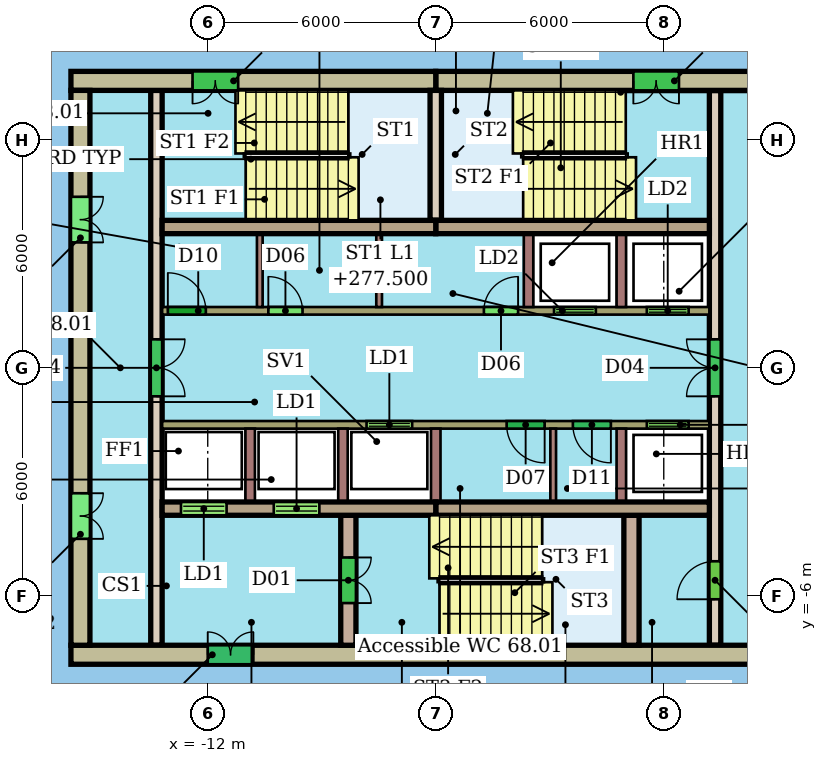
"""IFC4 building model, lengths in metres.
Left out: names, types, materials, properties, quantities, classifications, styles, units other than length and angle.
Written with IfcOpenShell. Run it as: python <this file> out.ifc"""

import sys

from ifc_helpers import new_model, si_unit, direction, frame, frame_2d, origin, place, context, subcontext, project, spatial, rectangle, extrude, element, fill, save


model = new_model("IFC4")
c1 = context("Model", 3, precision=1e-05, world=origin(), true_north=direction((0.0, 1.0)))
c2 = subcontext(c1, "Body", "Model", "MODEL_VIEW")
j1 = project(units=[si_unit("LENGTHUNIT", "METRE"), si_unit("PLANEANGLEUNIT", "RADIAN")], contexts=[c1])
p1 = place(None, origin())
s1 = spatial("IfcSite", under=j1, at=p1, CompositionType="ELEMENT")
p2 = place(p1, origin())
s2 = spatial("IfcBuilding", under=s1, at=p2, CompositionType="ELEMENT")
p3 = place(p2, frame((0.0, 0.0, 275.7)))
s3 = spatial("IfcBuildingStorey", under=s2, at=p3, CompositionType="ELEMENT", Elevation=275.7)
p4 = place(p3, frame((3.6, 7.55, 0.0), z_axis=(0.0, 0.0, 1.0), x_axis=(-1.0, 0.0, 0.0)))
e1 = element("IfcWall", 1, at=p4, inside=s3, PredefinedType="SHEAR", context=c2, shape_type="SweptSolid", body=[
    extrude(rectangle(XDim=9.6, YDim=0.5, at=frame_2d((4.8, 0.0))), origin(), (0.0, 0.0, 1.0), 3.3),
])
p5 = place(p4, frame((3.2, 0.0, 0.0)))
e2 = element("IfcOpeningElement", 2, at=p5, cuts=e1, PredefinedType="OPENING", context=c2, shape_type="SweptSolid", body=[
    extrude(rectangle(XDim=1.2, YDim=2.1, at=frame_2d((0.6, 1.05))), frame((0.0, 0.26, 0.0), z_axis=(0.0, -1.0, 0.0), x_axis=(1.0, 0.0, 0.0)), (0.0, 0.0, 1.0), 0.52),
])
p6 = place(p3, frame((-6.0, 7.55, 0.0), z_axis=(0.0, 0.0, 1.0), x_axis=(-1.0, 0.0, 0.0)))
e3 = element("IfcWall", 3, at=p6, inside=s3, PredefinedType="SHEAR", context=c2, shape_type="SweptSolid", body=[
    extrude(rectangle(XDim=9.6, YDim=0.5, at=frame_2d((4.8, 0.0))), origin(), (0.0, 0.0, 1.0), 3.3),
])
p7 = place(p6, frame((5.2, 0.0, 0.0)))
e4 = element("IfcOpeningElement", 4, at=p7, cuts=e3, PredefinedType="OPENING", context=c2, shape_type="SweptSolid", body=[
    extrude(rectangle(XDim=1.2, YDim=2.1, at=frame_2d((0.6, 1.05))), frame((0.0, 0.26, 0.0), z_axis=(0.0, -1.0, 0.0), x_axis=(1.0, 0.0, 0.0)), (0.0, 0.0, 1.0), 0.52),
])
p8 = place(p3, frame((-15.6, -7.55, 0.0), z_axis=(0.0, 0.0, 1.0), x_axis=(1.0, 0.0, 0.0)))
e5 = element("IfcWall", 5, at=p8, inside=s3, PredefinedType="SHEAR", context=c2, shape_type="SweptSolid", body=[
    extrude(rectangle(XDim=19.2, YDim=0.5, at=frame_2d((9.6, 0.0))), origin(), (0.0, 0.0, 1.0), 3.3),
])
p9 = place(p8, frame((3.6, 0.0, 0.0)))
e6 = element("IfcOpeningElement", 6, at=p9, cuts=e5, PredefinedType="OPENING", context=c2, shape_type="SweptSolid", body=[
    extrude(rectangle(XDim=1.2, YDim=2.1, at=frame_2d((0.6, 1.05))), frame((0.0, 0.26, 0.0), z_axis=(0.0, -1.0, 0.0), x_axis=(1.0, 0.0, 0.0)), (0.0, 0.0, 1.0), 0.52),
])
p10 = place(p3, frame((-15.35, 7.3, 0.0), z_axis=(0.0, 0.0, 1.0), x_axis=(0.0, -1.0, 0.0)))
e7 = element("IfcWall", 7, at=p10, inside=s3, PredefinedType="SHEAR", context=c2, shape_type="SweptSolid", body=[
    extrude(rectangle(XDim=14.6, YDim=0.5, at=frame_2d((7.3, 0.0))), origin(), (0.0, 0.0, 1.0), 3.3),
])
p11 = place(p10, frame((10.6, 0.0, 0.0)))
e8 = element("IfcOpeningElement", 8, at=p11, cuts=e7, PredefinedType="OPENING", context=c2, shape_type="SweptSolid", body=[
    extrude(rectangle(XDim=1.2, YDim=2.1, at=frame_2d((0.6, 1.05))), frame((0.0, 0.26, 0.0), z_axis=(0.0, -1.0, 0.0), x_axis=(1.0, 0.0, 0.0)), (0.0, 0.0, 1.0), 0.52),
])
p12 = place(p10, frame((2.8, 0.0, 0.0)))
e9 = element("IfcOpeningElement", 9, at=p12, cuts=e7, PredefinedType="OPENING", context=c2, shape_type="SweptSolid", body=[
    extrude(rectangle(XDim=1.2, YDim=2.1, at=frame_2d((0.6, 1.05))), frame((0.0, 0.26, 0.0), z_axis=(0.0, -1.0, 0.0), x_axis=(1.0, 0.0, 0.0)), (0.0, 0.0, 1.0), 0.52),
])
for number, where, z_axis, x_axis in (
    (10, (-13.2, 3.705, 0.0), (0.0, 0.0, 1.0), (1.0, 0.0, 0.0)),
    (11, (-6.0, 3.705, 0.0), (0.0, 0.0, 1.0), (1.0, 0.0, 0.0)),
):
    element("IfcWall", number, at=place(p3, frame(where, z_axis=z_axis, x_axis=x_axis)), inside=s3, PredefinedType="SHEAR", context=c2, shape_type="SweptSolid", body=[
        extrude(rectangle(XDim=7.2, YDim=0.35, at=frame_2d((3.6, 0.0))), origin(), (0.0, 0.0, 1.0), 3.3),
    ])
p13 = place(p3, frame((-13.2, -3.705, 0.0), z_axis=(0.0, 0.0, 1.0), x_axis=(1.0, 0.0, 0.0)))
e12 = element("IfcWall", 12, at=p13, inside=s3, PredefinedType="SHEAR", context=c2, shape_type="SweptSolid", body=[
    extrude(rectangle(XDim=7.2, YDim=0.35, at=frame_2d((3.6, 0.0))), origin(), (0.0, 0.0, 1.0), 3.3),
])
p14 = place(p13, frame((0.496, 0.0, 0.0)))
e13 = element("IfcOpeningElement", 13, at=p14, cuts=e12, PredefinedType="OPENING", context=c2, shape_type="SweptSolid", body=[
    extrude(rectangle(XDim=1.2, YDim=2.1, at=frame_2d((0.6, 1.05))), frame((0.0, 0.185, 0.0), z_axis=(0.0, -1.0, 0.0), x_axis=(1.0, 0.0, 0.0)), (0.0, 0.0, 1.0), 0.37),
])
p15 = place(p13, frame((2.938, 0.0, 0.0)))
e14 = element("IfcOpeningElement", 14, at=p15, cuts=e12, PredefinedType="OPENING", context=c2, shape_type="SweptSolid", body=[
    extrude(rectangle(XDim=1.2, YDim=2.1, at=frame_2d((0.6, 1.05))), frame((0.0, 0.185, 0.0), z_axis=(0.0, -1.0, 0.0), x_axis=(1.0, 0.0, 0.0)), (0.0, 0.0, 1.0), 0.37),
])
p16 = place(p3, frame((-6.0, -3.705, 0.0), z_axis=(0.0, 0.0, 1.0), x_axis=(1.0, 0.0, 0.0)))
e15 = element("IfcWall", 15, at=p16, inside=s3, PredefinedType="SHEAR", context=c2, shape_type="SweptSolid", body=[
    extrude(rectangle(XDim=7.2, YDim=0.35, at=frame_2d((3.6, 0.0))), origin(), (0.0, 0.0, 1.0), 3.3),
])
p17 = place(p3, frame((-13.35, 7.3, 0.0), z_axis=(0.0, 0.0, 1.0), x_axis=(0.0, -1.0, 0.0)))
e16 = element("IfcWall", 16, at=p17, inside=s3, PredefinedType="SHEAR", context=c2, shape_type="SweptSolid", body=[
    extrude(rectangle(XDim=14.6, YDim=0.3, at=frame_2d((7.3, 0.0))), origin(), (0.0, 0.0, 1.0), 3.3),
])
p18 = place(p17, frame((6.55, 0.0, 0.0)))
e17 = element("IfcOpeningElement", 17, at=p18, cuts=e16, PredefinedType="OPENING", context=c2, shape_type="SweptSolid", body=[
    extrude(rectangle(XDim=1.5, YDim=2.1, at=frame_2d((0.75, 1.05))), frame((0.0, 0.16, 0.0), z_axis=(0.0, -1.0, 0.0), x_axis=(1.0, 0.0, 0.0)), (0.0, 0.0, 1.0), 0.32),
])
p19 = place(p3, frame((1.35, -7.3, 0.0), z_axis=(0.0, 0.0, 1.0), x_axis=(0.0, 1.0, 0.0)))
e18 = element("IfcWall", 18, at=p19, inside=s3, PredefinedType="SHEAR", context=c2, shape_type="SweptSolid", body=[
    extrude(rectangle(XDim=14.6, YDim=0.3, at=frame_2d((7.3, 0.0))), origin(), (0.0, 0.0, 1.0), 3.3),
])
p20 = place(p19, frame((1.21, 0.0, 0.0)))
e19 = element("IfcOpeningElement", 19, at=p20, cuts=e18, PredefinedType="OPENING", context=c2, shape_type="SweptSolid", body=[
    extrude(rectangle(XDim=1.0, YDim=2.1, at=frame_2d((0.5, 1.05))), frame((0.0, 0.16, 0.0), z_axis=(0.0, -1.0, 0.0), x_axis=(1.0, 0.0, 0.0)), (0.0, 0.0, 1.0), 0.32),
])
p21 = place(p19, frame((6.55, 0.0, 0.0)))
e20 = element("IfcOpeningElement", 20, at=p21, cuts=e18, PredefinedType="OPENING", context=c2, shape_type="SweptSolid", body=[
    extrude(rectangle(XDim=1.5, YDim=2.1, at=frame_2d((0.75, 1.05))), frame((0.0, 0.16, 0.0), z_axis=(0.0, -1.0, 0.0), x_axis=(1.0, 0.0, 0.0)), (0.0, 0.0, 1.0), 0.32),
])
p22 = place(p3, frame((-13.2, 1.5, 0.0), z_axis=(0.0, 0.0, 1.0), x_axis=(1.0, 0.0, 0.0)))
e21 = element("IfcWall", 21, at=p22, inside=s3, PredefinedType="SHEAR", context=c2, shape_type="SweptSolid", body=[
    extrude(rectangle(XDim=14.4, YDim=0.2, at=frame_2d((7.2, 0.0))), origin(), (0.0, 0.0, 1.0), 3.3),
])
p23 = place(p22, frame((10.312, 0.0, 0.0)))
e22 = element("IfcOpeningElement", 22, at=p23, cuts=e21, PredefinedType="OPENING", context=c2, shape_type="SweptSolid", body=[
    extrude(rectangle(XDim=1.1, YDim=2.1, at=frame_2d((0.55, 1.05))), frame((0.0, 0.11, 0.0), z_axis=(0.0, -1.0, 0.0), x_axis=(1.0, 0.0, 0.0)), (0.0, 0.0, 1.0), 0.22),
])
p24 = place(p22, frame((12.754, 0.0, 0.0)))
e23 = element("IfcOpeningElement", 23, at=p24, cuts=e21, PredefinedType="OPENING", context=c2, shape_type="SweptSolid", body=[
    extrude(rectangle(XDim=1.1, YDim=2.1, at=frame_2d((0.55, 1.05))), frame((0.0, 0.11, 0.0), z_axis=(0.0, -1.0, 0.0), x_axis=(1.0, 0.0, 0.0)), (0.0, 0.0, 1.0), 0.22),
])
p25 = place(p22, frame((0.15, 0.0, 0.0)))
e24 = element("IfcOpeningElement", 24, at=p25, cuts=e21, PredefinedType="OPENING", context=c2, shape_type="SweptSolid", body=[
    extrude(rectangle(XDim=1.0, YDim=2.1, at=frame_2d((0.5, 1.05))), frame((0.0, 0.11, 0.0), z_axis=(0.0, -1.0, 0.0), x_axis=(1.0, 0.0, 0.0)), (0.0, 0.0, 1.0), 0.22),
])
p26 = place(p22, frame((2.794, 0.0, 0.0)))
e25 = element("IfcOpeningElement", 25, at=p26, cuts=e21, PredefinedType="OPENING", context=c2, shape_type="SweptSolid", body=[
    extrude(rectangle(XDim=0.9, YDim=2.1, at=frame_2d((0.45, 1.05))), frame((0.0, 0.11, 0.0), z_axis=(0.0, -1.0, 0.0), x_axis=(1.0, 0.0, 0.0)), (0.0, 0.0, 1.0), 0.22),
])
p27 = place(p22, frame((8.467, 0.0, 0.0)))
e26 = element("IfcOpeningElement", 26, at=p27, cuts=e21, PredefinedType="OPENING", context=c2, shape_type="SweptSolid", body=[
    extrude(rectangle(XDim=0.9, YDim=2.1, at=frame_2d((0.45, 1.05))), frame((0.0, 0.11, 0.0), z_axis=(0.0, -1.0, 0.0), x_axis=(1.0, 0.0, 0.0)), (0.0, 0.0, 1.0), 0.22),
])
p28 = place(p3, frame((1.2, -1.5, 0.0), z_axis=(0.0, 0.0, 1.0), x_axis=(-1.0, 0.0, 0.0)))
e27 = element("IfcWall", 27, at=p28, inside=s3, PredefinedType="SHEAR", context=c2, shape_type="SweptSolid", body=[
    extrude(rectangle(XDim=14.4, YDim=0.2, at=frame_2d((7.2, 0.0))), origin(), (0.0, 0.0, 1.0), 3.3),
])
p29 = place(p28, frame((7.821, 0.0, 0.0)))
e28 = element("IfcOpeningElement", 28, at=p29, cuts=e27, PredefinedType="OPENING", context=c2, shape_type="SweptSolid", body=[
    extrude(rectangle(XDim=1.2, YDim=2.1, at=frame_2d((0.6, 1.05))), frame((0.0, 0.11, 0.0), z_axis=(0.0, -1.0, 0.0), x_axis=(1.0, 0.0, 0.0)), (0.0, 0.0, 1.0), 0.22),
])
p30 = place(p28, frame((0.546, 0.0, 0.0)))
e29 = element("IfcOpeningElement", 29, at=p30, cuts=e27, PredefinedType="OPENING", context=c2, shape_type="SweptSolid", body=[
    extrude(rectangle(XDim=1.1, YDim=2.1, at=frame_2d((0.55, 1.05))), frame((0.0, 0.11, 0.0), z_axis=(0.0, -1.0, 0.0), x_axis=(1.0, 0.0, 0.0)), (0.0, 0.0, 1.0), 0.22),
])
p31 = place(p28, frame((4.335, 0.0, 0.0)))
e30 = element("IfcOpeningElement", 30, at=p31, cuts=e27, PredefinedType="OPENING", context=c2, shape_type="SweptSolid", body=[
    extrude(rectangle(XDim=1.0, YDim=2.1, at=frame_2d((0.5, 1.05))), frame((0.0, 0.11, 0.0), z_axis=(0.0, -1.0, 0.0), x_axis=(1.0, 0.0, 0.0)), (0.0, 0.0, 1.0), 0.22),
])
p32 = place(p28, frame((2.592, 0.0, 0.0)))
e31 = element("IfcOpeningElement", 31, at=p32, cuts=e27, PredefinedType="OPENING", context=c2, shape_type="SweptSolid", body=[
    extrude(rectangle(XDim=1.0, YDim=2.1, at=frame_2d((0.5, 1.05))), frame((0.0, 0.11, 0.0), z_axis=(0.0, -1.0, 0.0), x_axis=(1.0, 0.0, 0.0)), (0.0, 0.0, 1.0), 0.22),
])
p33 = place(p3, frame((-8.3, -3.88, 0.0), z_axis=(0.0, 0.0, 1.0), x_axis=(0.0, -1.0, 0.0)))
e32 = element("IfcWall", 32, at=p33, inside=s3, PredefinedType="SHEAR", context=c2, shape_type="SweptSolid", body=[
    extrude(rectangle(XDim=3.42, YDim=0.4, at=frame_2d((1.71, 0.0))), origin(), (0.0, 0.0, 1.0), 3.3),
])
p34 = place(p33, frame((1.11, 0.0, 0.0)))
e33 = element("IfcOpeningElement", 33, at=p34, cuts=e32, PredefinedType="OPENING", context=c2, shape_type="SweptSolid", body=[
    extrude(rectangle(XDim=1.2, YDim=2.1, at=frame_2d((0.6, 1.05))), frame((0.0, 0.21, 0.0), z_axis=(0.0, -1.0, 0.0), x_axis=(1.0, 0.0, 0.0)), (0.0, 0.0, 1.0), 0.42),
])
p35 = place(p3, frame((-0.85, -3.88, 0.0), z_axis=(0.0, 0.0, 1.0), x_axis=(0.0, -1.0, 0.0)))
e34 = element("IfcWall", 34, at=p35, inside=s3, PredefinedType="SHEAR", context=c2, shape_type="SweptSolid", body=[
    extrude(rectangle(XDim=3.42, YDim=0.4, at=frame_2d((1.71, 0.0))), origin(), (0.0, 0.0, 1.0), 3.3),
])
p36 = place(p3, frame((-6.0, 3.88, 0.0), z_axis=(0.0, 0.0, 1.0), x_axis=(0.0, 1.0, 0.0)))
e35 = element("IfcWall", 35, at=p36, inside=s3, PredefinedType="SHEAR", context=c2, shape_type="SweptSolid", body=[
    extrude(rectangle(XDim=3.42, YDim=0.3, at=frame_2d((1.71, 0.0))), origin(), (0.0, 0.0, 1.0), 3.3),
])
for number, where, z_axis, x_axis in (
    (36, (-3.558, 1.6, 0.0), (0.0, 0.0, 1.0), (0.0, 1.0, 0.0)),
    (37, (-1.117, 1.6, 0.0), (0.0, 0.0, 1.0), (0.0, 1.0, 0.0)),
):
    element("IfcWall", number, at=place(p3, frame(where, z_axis=z_axis, x_axis=x_axis)), inside=s3, PredefinedType="SHEAR", context=c2, shape_type="SweptSolid", body=[
        extrude(rectangle(XDim=1.93, YDim=0.25, at=frame_2d((0.965, 0.0))), origin(), (0.0, 0.0, 1.0), 3.3),
    ])
for number, where, z_axis, x_axis in (
    (38, (-10.631, 1.6, 0.0), (0.0, 0.0, 1.0), (0.0, 1.0, 0.0)),
    (39, (-7.49, 1.6, 0.0), (0.0, 0.0, 1.0), (0.0, 1.0, 0.0)),
):
    element("IfcWall", number, at=place(p3, frame(where, z_axis=z_axis, x_axis=x_axis)), inside=s3, PredefinedType="PARTITIONING", context=c2, shape_type="SweptSolid", body=[
        extrude(rectangle(XDim=1.93, YDim=0.15, at=frame_2d((0.965, 0.0))), origin(), (0.0, 0.0, 1.0), 3.3),
    ])
for number, where, z_axis, x_axis in (
    (40, (-10.883, -1.6, 0.0), (0.0, 0.0, 1.0), (0.0, -1.0, 0.0)),
    (41, (-8.442, -1.6, 0.0), (0.0, 0.0, 1.0), (0.0, -1.0, 0.0)),
    (42, (-6.0, -1.6, 0.0), (0.0, 0.0, 1.0), (0.0, -1.0, 0.0)),
    (43, (-1.117, -1.6, 0.0), (0.0, 0.0, 1.0), (0.0, -1.0, 0.0)),
):
    element("IfcWall", number, at=place(p3, frame(where, z_axis=z_axis, x_axis=x_axis)), inside=s3, PredefinedType="SHEAR", context=c2, shape_type="SweptSolid", body=[
        extrude(rectangle(XDim=1.93, YDim=0.25, at=frame_2d((0.965, 0.0))), origin(), (0.0, 0.0, 1.0), 3.3),
    ])
p37 = place(p3, frame((-2.91, -1.6, 0.0), z_axis=(0.0, 0.0, 1.0), x_axis=(0.0, -1.0, 0.0)))
e44 = element("IfcWall", 44, at=p37, inside=s3, PredefinedType="PARTITIONING", context=c2, shape_type="SweptSolid", body=[
    extrude(rectangle(XDim=1.93, YDim=0.15, at=frame_2d((0.965, 0.0))), origin(), (0.0, 0.0, 1.0), 3.3),
])
p38 = place(p5, origin())
e45 = element("IfcDoor", 45, at=p38, inside=s3, OperationType="DOUBLE_DOOR_SINGLE_SWING", PredefinedType="NOTDEFINED", context=c2, shape_type="SweptSolid", body=[
    extrude(rectangle(XDim=1.2, YDim=2.1, at=frame_2d((0.6, 1.05))), frame((0.0, 0.025, 0.0), z_axis=(0.0, -1.0, 0.0), x_axis=(1.0, 0.0, 0.0)), (0.0, 0.0, 1.0), 0.05),
])
fill(e2, e45)
p39 = place(p7, origin())
e46 = element("IfcDoor", 46, at=p39, inside=s3, OperationType="DOUBLE_DOOR_SINGLE_SWING", PredefinedType="NOTDEFINED", context=c2, shape_type="SweptSolid", body=[
    extrude(rectangle(XDim=1.2, YDim=2.1, at=frame_2d((0.6, 1.05))), frame((0.0, 0.025, 0.0), z_axis=(0.0, -1.0, 0.0), x_axis=(1.0, 0.0, 0.0)), (0.0, 0.0, 1.0), 0.05),
])
fill(e4, e46)
p40 = place(p9, origin())
e47 = element("IfcDoor", 47, at=p40, inside=s3, OperationType="DOUBLE_DOOR_SINGLE_SWING", PredefinedType="NOTDEFINED", context=c2, shape_type="SweptSolid", body=[
    extrude(rectangle(XDim=1.2, YDim=2.1, at=frame_2d((0.6, 1.05))), frame((0.0, 0.025, 0.0), z_axis=(0.0, -1.0, 0.0), x_axis=(1.0, 0.0, 0.0)), (0.0, 0.0, 1.0), 0.05),
])
fill(e6, e47)
p41 = place(p11, origin())
e48 = element("IfcDoor", 48, at=p41, inside=s3, OperationType="DOUBLE_DOOR_SINGLE_SWING", PredefinedType="NOTDEFINED", context=c2, shape_type="SweptSolid", body=[
    extrude(rectangle(XDim=1.2, YDim=2.1, at=frame_2d((0.6, 1.05))), frame((0.0, 0.025, 0.0), z_axis=(0.0, -1.0, 0.0), x_axis=(1.0, 0.0, 0.0)), (0.0, 0.0, 1.0), 0.05),
])
fill(e8, e48)
p42 = place(p12, origin())
e49 = element("IfcDoor", 49, at=p42, inside=s3, OperationType="DOUBLE_DOOR_SINGLE_SWING", PredefinedType="NOTDEFINED", context=c2, shape_type="SweptSolid", body=[
    extrude(rectangle(XDim=1.2, YDim=2.1, at=frame_2d((0.6, 1.05))), frame((0.0, 0.025, 0.0), z_axis=(0.0, -1.0, 0.0), x_axis=(1.0, 0.0, 0.0)), (0.0, 0.0, 1.0), 0.05),
])
fill(e9, e49)
p43 = place(p14, origin())
e50 = element("IfcDoor", 50, at=p43, inside=s3, OperationType="DOUBLE_DOOR_SLIDING", PredefinedType="NOTDEFINED", context=c2, shape_type="SweptSolid", body=[
    extrude(rectangle(XDim=1.2, YDim=2.1, at=frame_2d((0.6, 1.05))), frame((0.0, 0.025, 0.0), z_axis=(0.0, -1.0, 0.0), x_axis=(1.0, 0.0, 0.0)), (0.0, 0.0, 1.0), 0.05),
])
fill(e13, e50)
p44 = place(p15, origin())
e51 = element("IfcDoor", 51, at=p44, inside=s3, OperationType="DOUBLE_DOOR_SLIDING", PredefinedType="NOTDEFINED", context=c2, shape_type="SweptSolid", body=[
    extrude(rectangle(XDim=1.2, YDim=2.1, at=frame_2d((0.6, 1.05))), frame((0.0, 0.025, 0.0), z_axis=(0.0, -1.0, 0.0), x_axis=(1.0, 0.0, 0.0)), (0.0, 0.0, 1.0), 0.05),
])
fill(e14, e51)
p45 = place(p18, origin())
e52 = element("IfcDoor", 52, at=p45, inside=s3, OperationType="DOUBLE_DOOR_SINGLE_SWING", PredefinedType="NOTDEFINED", context=c2, shape_type="SweptSolid", body=[
    extrude(rectangle(XDim=1.5, YDim=2.1, at=frame_2d((0.75, 1.05))), frame((0.0, 0.025, 0.0), z_axis=(0.0, -1.0, 0.0), x_axis=(1.0, 0.0, 0.0)), (0.0, 0.0, 1.0), 0.05),
])
fill(e17, e52)
p46 = place(p20, origin())
e53 = element("IfcDoor", 53, at=p46, inside=s3, OperationType="SINGLE_SWING_LEFT", PredefinedType="NOTDEFINED", context=c2, shape_type="SweptSolid", body=[
    extrude(rectangle(XDim=1.0, YDim=2.1, at=frame_2d((0.5, 1.05))), frame((0.0, 0.025, 0.0), z_axis=(0.0, -1.0, 0.0), x_axis=(1.0, 0.0, 0.0)), (0.0, 0.0, 1.0), 0.05),
])
fill(e19, e53)
p47 = place(p21, origin())
e54 = element("IfcDoor", 54, at=p47, inside=s3, OperationType="DOUBLE_DOOR_SINGLE_SWING", PredefinedType="NOTDEFINED", context=c2, shape_type="SweptSolid", body=[
    extrude(rectangle(XDim=1.5, YDim=2.1, at=frame_2d((0.75, 1.05))), frame((0.0, 0.025, 0.0), z_axis=(0.0, -1.0, 0.0), x_axis=(1.0, 0.0, 0.0)), (0.0, 0.0, 1.0), 0.05),
])
fill(e20, e54)
p48 = place(p23, origin())
e55 = element("IfcDoor", 55, at=p48, inside=s3, OperationType="DOUBLE_DOOR_SLIDING", PredefinedType="NOTDEFINED", context=c2, shape_type="SweptSolid", body=[
    extrude(rectangle(XDim=1.1, YDim=2.1, at=frame_2d((0.55, 1.05))), frame((0.0, 0.025, 0.0), z_axis=(0.0, -1.0, 0.0), x_axis=(1.0, 0.0, 0.0)), (0.0, 0.0, 1.0), 0.05),
])
fill(e22, e55)
p49 = place(p24, origin())
e56 = element("IfcDoor", 56, at=p49, inside=s3, OperationType="DOUBLE_DOOR_SLIDING", PredefinedType="NOTDEFINED", context=c2, shape_type="SweptSolid", body=[
    extrude(rectangle(XDim=1.1, YDim=2.1, at=frame_2d((0.55, 1.05))), frame((0.0, 0.025, 0.0), z_axis=(0.0, -1.0, 0.0), x_axis=(1.0, 0.0, 0.0)), (0.0, 0.0, 1.0), 0.05),
])
fill(e23, e56)
p50 = place(p25, origin())
e57 = element("IfcDoor", 57, at=p50, inside=s3, OperationType="SINGLE_SWING_LEFT", PredefinedType="NOTDEFINED", context=c2, shape_type="SweptSolid", body=[
    extrude(rectangle(XDim=1.0, YDim=2.1, at=frame_2d((0.5, 1.05))), frame((0.0, 0.025, 0.0), z_axis=(0.0, -1.0, 0.0), x_axis=(1.0, 0.0, 0.0)), (0.0, 0.0, 1.0), 0.05),
])
fill(e24, e57)
p51 = place(p26, origin())
e58 = element("IfcDoor", 58, at=p51, inside=s3, OperationType="SINGLE_SWING_LEFT", PredefinedType="NOTDEFINED", context=c2, shape_type="SweptSolid", body=[
    extrude(rectangle(XDim=0.9, YDim=2.1, at=frame_2d((0.45, 1.05))), frame((0.0, 0.025, 0.0), z_axis=(0.0, -1.0, 0.0), x_axis=(1.0, 0.0, 0.0)), (0.0, 0.0, 1.0), 0.05),
])
fill(e25, e58)
p52 = place(p27, origin())
e59 = element("IfcDoor", 59, at=p52, inside=s3, OperationType="SINGLE_SWING_RIGHT", PredefinedType="NOTDEFINED", context=c2, shape_type="SweptSolid", body=[
    extrude(rectangle(XDim=0.9, YDim=2.1, at=frame_2d((0.45, 1.05))), frame((0.0, 0.025, 0.0), z_axis=(0.0, -1.0, 0.0), x_axis=(1.0, 0.0, 0.0)), (0.0, 0.0, 1.0), 0.05),
])
fill(e26, e59)
p53 = place(p29, origin())
e60 = element("IfcDoor", 60, at=p53, inside=s3, OperationType="DOUBLE_DOOR_SLIDING", PredefinedType="NOTDEFINED", context=c2, shape_type="SweptSolid", body=[
    extrude(rectangle(XDim=1.2, YDim=2.1, at=frame_2d((0.6, 1.05))), frame((0.0, 0.025, 0.0), z_axis=(0.0, -1.0, 0.0), x_axis=(1.0, 0.0, 0.0)), (0.0, 0.0, 1.0), 0.05),
])
fill(e28, e60)
p54 = place(p30, origin())
e61 = element("IfcDoor", 61, at=p54, inside=s3, OperationType="DOUBLE_DOOR_SLIDING", PredefinedType="NOTDEFINED", context=c2, shape_type="SweptSolid", body=[
    extrude(rectangle(XDim=1.1, YDim=2.1, at=frame_2d((0.55, 1.05))), frame((0.0, 0.025, 0.0), z_axis=(0.0, -1.0, 0.0), x_axis=(1.0, 0.0, 0.0)), (0.0, 0.0, 1.0), 0.05),
])
fill(e29, e61)
p55 = place(p31, origin())
e62 = element("IfcDoor", 62, at=p55, inside=s3, OperationType="SINGLE_SWING_LEFT", PredefinedType="NOTDEFINED", context=c2, shape_type="SweptSolid", body=[
    extrude(rectangle(XDim=1.0, YDim=2.1, at=frame_2d((0.5, 1.05))), frame((0.0, 0.025, 0.0), z_axis=(0.0, -1.0, 0.0), x_axis=(1.0, 0.0, 0.0)), (0.0, 0.0, 1.0), 0.05),
])
fill(e30, e62)
p56 = place(p32, origin())
e63 = element("IfcDoor", 63, at=p56, inside=s3, OperationType="SINGLE_SWING_LEFT", PredefinedType="NOTDEFINED", context=c2, shape_type="SweptSolid", body=[
    extrude(rectangle(XDim=1.0, YDim=2.1, at=frame_2d((0.5, 1.05))), frame((0.0, 0.025, 0.0), z_axis=(0.0, -1.0, 0.0), x_axis=(1.0, 0.0, 0.0)), (0.0, 0.0, 1.0), 0.05),
])
fill(e31, e63)
p57 = place(p34, origin())
e64 = element("IfcDoor", 64, at=p57, inside=s3, OperationType="DOUBLE_DOOR_SINGLE_SWING", PredefinedType="NOTDEFINED", context=c2, shape_type="SweptSolid", body=[
    extrude(rectangle(XDim=1.2, YDim=2.1, at=frame_2d((0.6, 1.05))), frame((0.0, 0.025, 0.0), z_axis=(0.0, -1.0, 0.0), x_axis=(1.0, 0.0, 0.0)), (0.0, 0.0, 1.0), 0.05),
])
fill(e33, e64)
save(model, sys.argv[1])
